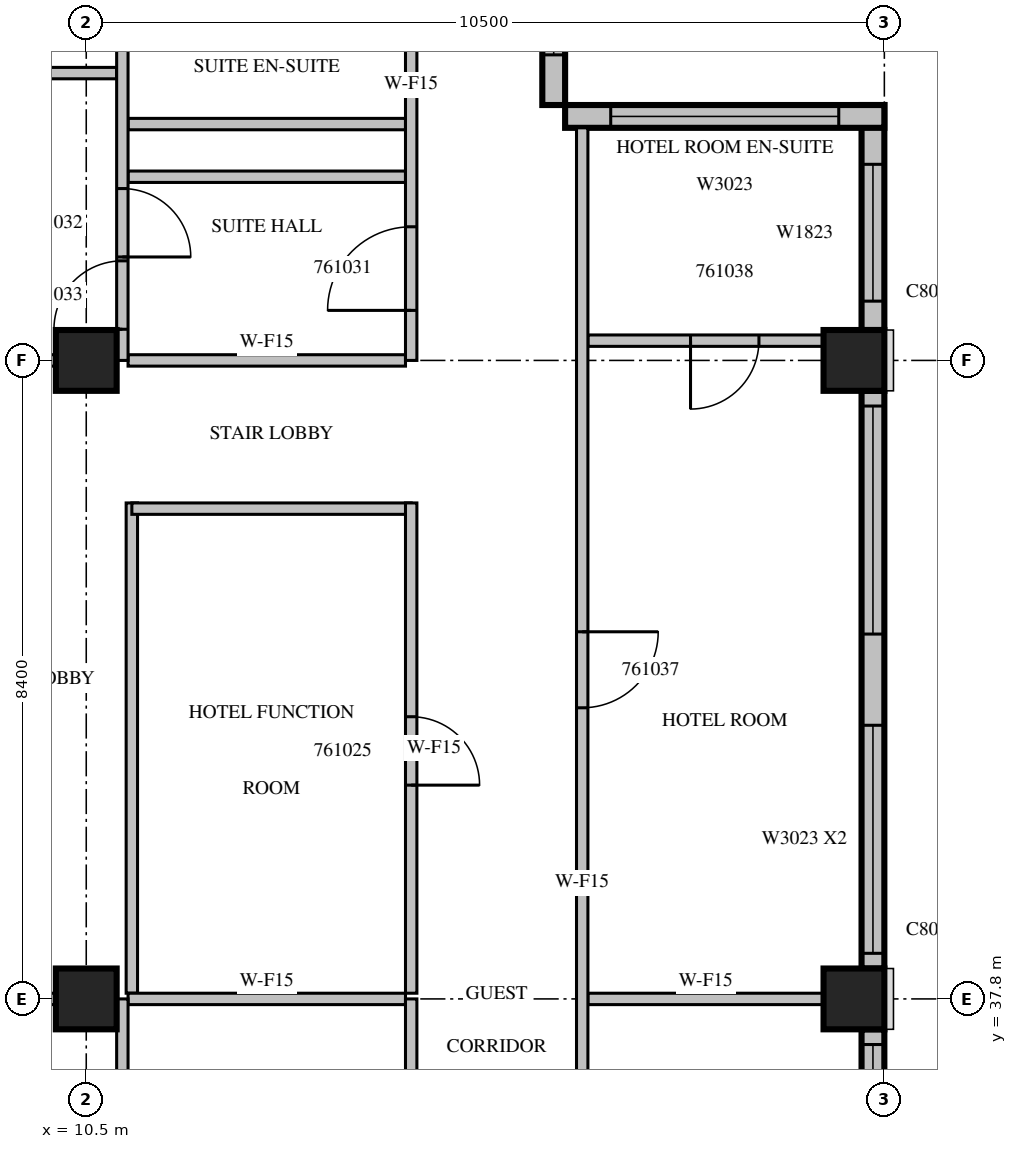
"""IFC4 building model, lengths in metres.
Left out: names, types, materials, properties, quantities, classifications, styles, units other than length and angle.
Written with IfcOpenShell. Run it as: python <this file> out.ifc"""

import sys

from ifc_helpers import new_model, si_unit, direction, frame, frame_2d, origin, origin_2d, place, context, subcontext, project, spatial, rectangle, extrude, source, transform, mapped, element, fill, save


model = new_model("IFC4")
c1 = context("Model", 3, precision=1e-05, world=origin(), true_north=direction((0.0, 1.0)))
c2 = subcontext(c1, "Body", "Model", "MODEL_VIEW")
j1 = project(units=[si_unit("LENGTHUNIT", "METRE"), si_unit("PLANEANGLEUNIT", "RADIAN")], contexts=[c1])
p1 = place(None, origin())
s1 = spatial("IfcSite", under=j1, at=p1, CompositionType="ELEMENT")
p2 = place(p1, origin())
s2 = spatial("IfcBuilding", under=s1, at=p2, CompositionType="ELEMENT")
p3 = place(p2, frame((0.0, 0.0, 265.2)))
s3 = spatial("IfcBuildingStorey", under=s2, at=p3, CompositionType="ELEMENT", Elevation=265.2)
m1 = source(origin(), c2, "Body", "SweptSolid", [
    extrude(rectangle(XDim=0.8, YDim=0.8, at=origin_2d()), origin(), (0.0, 0.0, 1.0), 3.8),
])
for number, where, z_axis, x_axis in (
    (1, (10.5, 37.8, 0.0), (0.0, 0.0, 1.0), (1.0, 0.0, 0.0)),
    (2, (20.6, 37.8, 0.0), (0.0, 0.0, 1.0), (1.0, 0.0, 0.0)),
    (3, (10.5, 46.2, 0.0), (0.0, 0.0, 1.0), (1.0, 0.0, 0.0)),
    (4, (20.6, 46.2, 0.0), (0.0, 0.0, 1.0), (1.0, 0.0, 0.0)),
):
    element("IfcColumn", number, at=place(p3, frame(where, z_axis=z_axis, x_axis=x_axis)), inside=s3, PredefinedType="COLUMN", context=c2, shape_type="MappedRepresentation", body=[
        mapped(m1, transform((0.0, 0.0, 0.0), scale=1.0)),
    ])
m2 = source(origin(), c2, "Body", "SweptSolid", [
    extrude(rectangle(XDim=7.6, YDim=0.3, at=frame_2d((3.8, 0.0))), origin(), (0.0, 0.0, 1.0), 3.4),
])
p4 = place(p3, frame((20.85, 29.8, 0.0), z_axis=(0.0, 0.0, 1.0), x_axis=(0.0, 1.0, 0.0)))
e5 = element("IfcWall", 5, at=p4, inside=s3, PredefinedType="STANDARD", context=c2, shape_type="MappedRepresentation", body=[
    mapped(m2, transform((0.0, 0.0, 0.0), scale=1.0)),
])
m3 = source(origin(), c2, "Body", "SweptSolid", [
    extrude(rectangle(XDim=3.0, YDim=2.3, at=frame_2d((1.5, 1.15))), frame((0.0, 0.16, 0.0), z_axis=(0.0, -1.0, 0.0), x_axis=(1.0, 0.0, 0.0)), (0.0, 0.0, 1.0), 0.32),
])
p5 = place(p4, frame((0.2, 0.0, 0.6)))
e6 = element("IfcOpeningElement", 6, at=p5, cuts=e5, PredefinedType="OPENING", context=c2, shape_type="MappedRepresentation", body=[
    mapped(m3, transform((0.0, 0.0, 0.0), scale=1.0)),
])
p6 = place(p4, frame((4.4, 0.0, 0.6)))
e7 = element("IfcOpeningElement", 7, at=p6, cuts=e5, PredefinedType="OPENING", context=c2, shape_type="MappedRepresentation", body=[
    mapped(m3, transform((0.0, 0.0, 0.0), scale=1.0)),
])
p7 = place(p3, frame((20.85, 38.2, 0.0), z_axis=(0.0, 0.0, 1.0), x_axis=(0.0, 1.0, 0.0)))
e8 = element("IfcWall", 8, at=p7, inside=s3, PredefinedType="STANDARD", context=c2, shape_type="MappedRepresentation", body=[
    mapped(m2, transform((0.0, 0.0, 0.0), scale=1.0)),
])
p8 = place(p7, frame((0.2, 0.0, 0.6)))
e9 = element("IfcOpeningElement", 9, at=p8, cuts=e8, PredefinedType="OPENING", context=c2, shape_type="MappedRepresentation", body=[
    mapped(m3, transform((0.0, 0.0, 0.0), scale=1.0)),
])
p9 = place(p7, frame((4.4, 0.0, 0.6)))
e10 = element("IfcOpeningElement", 10, at=p9, cuts=e8, PredefinedType="OPENING", context=c2, shape_type="MappedRepresentation", body=[
    mapped(m3, transform((0.0, 0.0, 0.0), scale=1.0)),
])
m4 = source(origin(), c2, "Body", "SweptSolid", [
    extrude(rectangle(XDim=2.96, YDim=0.3, at=frame_2d((1.48, 0.0))), origin(), (0.0, 0.0, 1.0), 3.4),
])
p10 = place(p3, frame((20.85, 46.6, 0.0), z_axis=(0.0, 0.0, 1.0), x_axis=(0.0, 1.0, 0.0)))
e11 = element("IfcWall", 11, at=p10, inside=s3, PredefinedType="STANDARD", context=c2, shape_type="MappedRepresentation", body=[
    mapped(m4, transform((0.0, 0.0, 0.0), scale=1.0)),
])
m5 = source(origin(), c2, "Body", "SweptSolid", [
    extrude(rectangle(XDim=1.8, YDim=2.3, at=frame_2d((0.9, 1.15))), frame((0.0, 0.16, 0.0), z_axis=(0.0, -1.0, 0.0), x_axis=(1.0, 0.0, 0.0)), (0.0, 0.0, 1.0), 0.32),
])
p11 = place(p10, frame((0.38, 0.0, 0.6)))
e12 = element("IfcOpeningElement", 12, at=p11, cuts=e11, PredefinedType="OPENING", context=c2, shape_type="MappedRepresentation", body=[
    mapped(m5, transform((0.0, 0.0, 0.0), scale=1.0)),
])
m6 = source(origin(), c2, "Body", "SweptSolid", [
    extrude(rectangle(XDim=4.2, YDim=0.3, at=frame_2d((2.1, 0.0))), origin(), (0.0, 0.0, 1.0), 3.4),
])
p12 = place(p3, frame((21.0, 49.41, 0.0), z_axis=(0.0, 0.0, 1.0), x_axis=(-1.0, 0.0, 0.0)))
e13 = element("IfcWall", 13, at=p12, inside=s3, PredefinedType="STANDARD", context=c2, shape_type="MappedRepresentation", body=[
    mapped(m6, transform((0.0, 0.0, 0.0), scale=1.0)),
])
p13 = place(p12, frame((0.6, 0.0, 0.6)))
e14 = element("IfcOpeningElement", 14, at=p13, cuts=e13, PredefinedType="OPENING", context=c2, shape_type="MappedRepresentation", body=[
    mapped(m3, transform((0.0, 0.0, 0.0), scale=1.0)),
])
m7 = source(origin(), c2, "Body", "SweptSolid", [
    extrude(rectangle(XDim=2.52, YDim=0.3, at=frame_2d((1.26, 0.0))), origin(), (0.0, 0.0, 1.0), 3.4),
])
p14 = place(p3, frame((16.65, 49.56, 0.0), z_axis=(0.0, 0.0, 1.0), x_axis=(0.0, 1.0, 0.0)))
e15 = element("IfcWall", 15, at=p14, inside=s3, PredefinedType="STANDARD", context=c2, shape_type="MappedRepresentation", body=[
    mapped(m7, transform((0.0, 0.0, 0.0), scale=1.0)),
])
m8 = source(origin(), c2, "Body", "SweptSolid", [
    extrude(rectangle(XDim=1.2, YDim=2.3, at=frame_2d((0.6, 1.15))), frame((0.0, 0.16, 0.0), z_axis=(0.0, -1.0, 0.0), x_axis=(1.0, 0.0, 0.0)), (0.0, 0.0, 1.0), 0.32),
])
p15 = place(p14, frame((0.66, 0.0, 0.6)))
e16 = element("IfcOpeningElement", 16, at=p15, cuts=e15, PredefinedType="OPENING", context=c2, shape_type="MappedRepresentation", body=[
    mapped(m8, transform((0.0, 0.0, 0.0), scale=1.0)),
])
m9 = source(origin(), c2, "Body", "SweptSolid", [
    extrude(rectangle(XDim=6.45, YDim=0.15, at=frame_2d((3.225, 0.0))), origin(), (0.0, 0.0, 1.0), 3.4),
])
p16 = place(p3, frame((11.1, 44.325, 0.0), z_axis=(0.0, 0.0, 1.0), x_axis=(0.0, -1.0, 0.0)))
e17 = element("IfcWall", 17, at=p16, inside=s3, PredefinedType="PARTITIONING", context=c2, shape_type="MappedRepresentation", body=[
    mapped(m9, transform((0.0, 0.0, 0.0), scale=1.0)),
])
m10 = source(origin(), c2, "Body", "SweptSolid", [
    extrude(rectangle(XDim=3.675, YDim=0.15, at=frame_2d((1.837, 0.0))), origin(), (0.0, 0.0, 1.0), 3.4),
])
p17 = place(p3, frame((14.775, 44.25, 0.0), z_axis=(0.0, 0.0, 1.0), x_axis=(-1.0, 0.0, 0.0)))
e18 = element("IfcWall", 18, at=p17, inside=s3, PredefinedType="PARTITIONING", context=c2, shape_type="MappedRepresentation", body=[
    mapped(m10, transform((0.0, 0.0, 0.0), scale=1.0)),
])
p18 = place(p3, frame((14.775, 37.875, 0.0), z_axis=(0.0, 0.0, 1.0), x_axis=(0.0, 1.0, 0.0)))
e19 = element("IfcWall", 19, at=p18, inside=s3, PredefinedType="PARTITIONING", context=c2, shape_type="MappedRepresentation", body=[
    mapped(m9, transform((0.0, 0.0, 0.0), scale=1.0)),
])
m11 = source(origin(), c2, "Body", "SweptSolid", [
    extrude(rectangle(XDim=0.9, YDim=2.1, at=frame_2d((0.45, 1.05))), frame((0.0, 0.085, 0.0), z_axis=(0.0, -1.0, 0.0), x_axis=(1.0, 0.0, 0.0)), (0.0, 0.0, 1.0), 0.17),
])
p19 = place(p18, frame((2.737, 0.0, 0.0)))
e20 = element("IfcOpeningElement", 20, at=p19, cuts=e19, PredefinedType="OPENING", context=c2, shape_type="MappedRepresentation", body=[
    mapped(m11, transform((0.0, 0.0, 0.0), scale=1.0)),
])
m12 = source(origin(), c2, "Body", "SweptSolid", [
    extrude(rectangle(XDim=3.596, YDim=0.15, at=frame_2d((1.798, 0.0))), origin(), (0.0, 0.0, 1.0), 3.4),
])
p20 = place(p3, frame((10.101, 37.8, 0.0), z_axis=(0.0, 0.0, 1.0), x_axis=(-1.0, 0.0, 0.0)))
e21 = element("IfcWall", 21, at=p20, inside=s3, PredefinedType="PARTITIONING", context=c2, shape_type="MappedRepresentation", body=[
    mapped(m12, transform((0.0, 0.0, 0.0), scale=1.0)),
])
m13 = source(origin(), c2, "Body", "SweptSolid", [
    extrude(rectangle(XDim=3.65, YDim=0.15, at=frame_2d((1.825, 0.0))), origin(), (0.0, 0.0, 1.0), 3.4),
])
p21 = place(p3, frame((14.7, 37.8, 0.0), z_axis=(0.0, 0.0, 1.0), x_axis=(-1.0, 0.0, 0.0)))
e22 = element("IfcWall", 22, at=p21, inside=s3, PredefinedType="PARTITIONING", context=c2, shape_type="MappedRepresentation", body=[
    mapped(m13, transform((0.0, 0.0, 0.0), scale=1.0)),
])
m14 = source(origin(), c2, "Body", "SweptSolid", [
    extrude(rectangle(XDim=8.4, YDim=0.15, at=frame_2d((4.2, 0.0))), origin(), (0.0, 0.0, 1.0), 3.4),
])
p22 = place(p3, frame((10.975, 29.4, 0.0), z_axis=(0.0, 0.0, 1.0), x_axis=(0.0, 1.0, 0.0)))
e23 = element("IfcWall", 23, at=p22, inside=s3, PredefinedType="PARTITIONING", context=c2, shape_type="MappedRepresentation", body=[
    mapped(m14, transform((0.0, 0.0, 0.0), scale=1.0)),
])
m15 = source(origin(), c2, "Body", "SweptSolid", [
    extrude(rectangle(XDim=1.1, YDim=2.1, at=frame_2d((0.55, 1.05))), frame((0.0, 0.085, 0.0), z_axis=(0.0, -1.0, 0.0), x_axis=(1.0, 0.0, 0.0)), (0.0, 0.0, 1.0), 0.17),
])
p23 = place(p22, frame((0.851, 0.0, 0.0)))
e24 = element("IfcOpeningElement", 24, at=p23, cuts=e23, PredefinedType="OPENING", context=c2, shape_type="MappedRepresentation", body=[
    mapped(m15, transform((0.0, 0.0, 0.0), scale=1.0)),
])
p24 = place(p22, frame((3.38, 0.0, 0.0)))
e25 = element("IfcOpeningElement", 25, at=p24, cuts=e23, PredefinedType="OPENING", context=c2, shape_type="MappedRepresentation", body=[
    mapped(m11, transform((0.0, 0.0, 0.0), scale=1.0)),
])
p25 = place(p22, frame((6.179, 0.0, 0.0)))
e26 = element("IfcOpeningElement", 26, at=p25, cuts=e23, PredefinedType="OPENING", context=c2, shape_type="MappedRepresentation", body=[
    mapped(m11, transform((0.0, 0.0, 0.0), scale=1.0)),
])
m16 = source(origin(), c2, "Body", "SweptSolid", [
    extrude(rectangle(XDim=4.395, YDim=0.15, at=frame_2d((2.197, 0.0))), origin(), (0.0, 0.0, 1.0), 3.4),
])
p26 = place(p3, frame((10.9, 49.98, 0.0), z_axis=(0.0, 0.0, 1.0), x_axis=(-1.0, 0.0, 0.0)))
e27 = element("IfcWall", 27, at=p26, inside=s3, PredefinedType="PARTITIONING", context=c2, shape_type="MappedRepresentation", body=[
    mapped(m16, transform((0.0, 0.0, 0.0), scale=1.0)),
])
m17 = source(origin(), c2, "Body", "SweptSolid", [
    extrude(rectangle(XDim=1.0, YDim=2.1, at=frame_2d((0.5, 1.05))), frame((0.0, 0.085, 0.0), z_axis=(0.0, -1.0, 0.0), x_axis=(1.0, 0.0, 0.0)), (0.0, 0.0, 1.0), 0.17),
])
p27 = place(p26, frame((3.3, 0.0, 0.0)))
e28 = element("IfcOpeningElement", 28, at=p27, cuts=e27, PredefinedType="OPENING", context=c2, shape_type="MappedRepresentation", body=[
    mapped(m17, transform((0.0, 0.0, 0.0), scale=1.0)),
])
for number, where, z_axis, x_axis in (
    (29, (14.7, 48.617, 0.0), (0.0, 0.0, 1.0), (-1.0, 0.0, 0.0)),
    (30, (14.7, 49.309, 0.0), (0.0, 0.0, 1.0), (-1.0, 0.0, 0.0)),
):
    element("IfcWall", number, at=place(p3, frame(where, z_axis=z_axis, x_axis=x_axis)), inside=s3, PredefinedType="PARTITIONING", context=c2, shape_type="MappedRepresentation", body=[
        mapped(m13, transform((0.0, 0.0, 0.0), scale=1.0)),
    ])
p28 = place(p3, frame((10.101, 46.2, 0.0), z_axis=(0.0, 0.0, 1.0), x_axis=(-1.0, 0.0, 0.0)))
e31 = element("IfcWall", 31, at=p28, inside=s3, PredefinedType="PARTITIONING", context=c2, shape_type="MappedRepresentation", body=[
    mapped(m12, transform((0.0, 0.0, 0.0), scale=1.0)),
])
p29 = place(p3, frame((14.7, 46.2, 0.0), z_axis=(0.0, 0.0, 1.0), x_axis=(-1.0, 0.0, 0.0)))
e32 = element("IfcWall", 32, at=p29, inside=s3, PredefinedType="PARTITIONING", context=c2, shape_type="MappedRepresentation", body=[
    mapped(m13, transform((0.0, 0.0, 0.0), scale=1.0)),
])
m18 = source(origin(), c2, "Body", "SweptSolid", [
    extrude(rectangle(XDim=7.26, YDim=0.15, at=frame_2d((3.63, 0.0))), origin(), (0.0, 0.0, 1.0), 3.4),
])
p30 = place(p3, frame((10.975, 46.2, 0.0), z_axis=(0.0, 0.0, 1.0), x_axis=(0.0, 1.0, 0.0)))
e33 = element("IfcWall", 33, at=p30, inside=s3, PredefinedType="PARTITIONING", context=c2, shape_type="MappedRepresentation", body=[
    mapped(m18, transform((0.0, 0.0, 0.0), scale=1.0)),
])
p31 = place(p30, frame((1.361, 0.0, 0.0)))
e34 = element("IfcOpeningElement", 34, at=p31, cuts=e33, PredefinedType="OPENING", context=c2, shape_type="MappedRepresentation", body=[
    mapped(m11, transform((0.0, 0.0, 0.0), scale=1.0)),
])
p32 = place(p30, frame((0.41, 0.0, 0.0)))
e35 = element("IfcOpeningElement", 35, at=p32, cuts=e33, PredefinedType="OPENING", context=c2, shape_type="MappedRepresentation", body=[
    mapped(m11, transform((0.0, 0.0, 0.0), scale=1.0)),
])
p33 = place(p30, frame((4.096, 0.0, 0.0)))
e36 = element("IfcOpeningElement", 36, at=p33, cuts=e33, PredefinedType="OPENING", context=c2, shape_type="MappedRepresentation", body=[
    mapped(m11, transform((0.0, 0.0, 0.0), scale=1.0)),
])
m19 = source(origin(), c2, "Body", "SweptSolid", [
    extrude(rectangle(XDim=3.101, YDim=0.15, at=frame_2d((1.55, 0.0))), origin(), (0.0, 0.0, 1.0), 3.4),
])
p34 = place(p3, frame((17.1, 46.46, 0.0), z_axis=(0.0, 0.0, 1.0), x_axis=(1.0, 0.0, 0.0)))
e37 = element("IfcWall", 37, at=p34, inside=s3, PredefinedType="PARTITIONING", context=c2, shape_type="MappedRepresentation", body=[
    mapped(m19, transform((0.0, 0.0, 0.0), scale=1.0)),
])
p35 = place(p34, frame((1.35, 0.0, 0.0)))
e38 = element("IfcOpeningElement", 38, at=p35, cuts=e37, PredefinedType="OPENING", context=c2, shape_type="MappedRepresentation", body=[
    mapped(m11, transform((0.0, 0.0, 0.0), scale=1.0)),
])
p36 = place(p3, frame((20.201, 37.8, 0.0), z_axis=(0.0, 0.0, 1.0), x_axis=(-1.0, 0.0, 0.0)))
e39 = element("IfcWall", 39, at=p36, inside=s3, PredefinedType="PARTITIONING", context=c2, shape_type="MappedRepresentation", body=[
    mapped(m19, transform((0.0, 0.0, 0.0), scale=1.0)),
])
p37 = place(p3, frame((14.775, 29.4, 0.0), z_axis=(0.0, 0.0, 1.0), x_axis=(0.0, 1.0, 0.0)))
e40 = element("IfcWall", 40, at=p37, inside=s3, PredefinedType="PARTITIONING", context=c2, shape_type="MappedRepresentation", body=[
    mapped(m14, transform((0.0, 0.0, 0.0), scale=1.0)),
])
p38 = place(p37, frame((0.638, 0.0, 0.0)))
e41 = element("IfcOpeningElement", 41, at=p38, cuts=e40, PredefinedType="OPENING", context=c2, shape_type="MappedRepresentation", body=[
    mapped(m15, transform((0.0, 0.0, 0.0), scale=1.0)),
])
p39 = place(p3, frame((14.775, 46.2, 0.0), z_axis=(0.0, 0.0, 1.0), x_axis=(0.0, 1.0, 0.0)))
e42 = element("IfcWall", 42, at=p39, inside=s3, PredefinedType="PARTITIONING", context=c2, shape_type="MappedRepresentation", body=[
    mapped(m18, transform((0.0, 0.0, 0.0), scale=1.0)),
])
p40 = place(p39, frame((0.658, 0.0, 0.0)))
e43 = element("IfcOpeningElement", 43, at=p40, cuts=e42, PredefinedType="OPENING", context=c2, shape_type="MappedRepresentation", body=[
    mapped(m15, transform((0.0, 0.0, 0.0), scale=1.0)),
])
m20 = source(origin(), c2, "Body", "SweptSolid", [
    extrude(rectangle(XDim=19.86, YDim=0.15, at=frame_2d((9.93, 0.0))), origin(), (0.0, 0.0, 1.0), 3.4),
])
p41 = place(p3, frame((17.025, 49.26, 0.0), z_axis=(0.0, 0.0, 1.0), x_axis=(0.0, -1.0, 0.0)))
e44 = element("IfcWall", 44, at=p41, inside=s3, PredefinedType="PARTITIONING", context=c2, shape_type="MappedRepresentation", body=[
    mapped(m20, transform((0.0, 0.0, 0.0), scale=1.0)),
])
m21 = source(origin(), c2, "Body", "SweptSolid", [
    extrude(rectangle(XDim=1.2, YDim=2.1, at=frame_2d((0.6, 1.05))), frame((0.0, 0.085, 0.0), z_axis=(0.0, -1.0, 0.0), x_axis=(1.0, 0.0, 0.0)), (0.0, 0.0, 1.0), 0.17),
])
p42 = place(p41, frame((15.06, 0.0, 0.0)))
e45 = element("IfcOpeningElement", 45, at=p42, cuts=e44, PredefinedType="OPENING", context=c2, shape_type="MappedRepresentation", body=[
    mapped(m21, transform((0.0, 0.0, 0.0), scale=1.0)),
])
p43 = place(p41, frame((6.63, 0.0, 0.0)))
e46 = element("IfcOpeningElement", 46, at=p43, cuts=e44, PredefinedType="OPENING", context=c2, shape_type="MappedRepresentation", body=[
    mapped(m17, transform((0.0, 0.0, 0.0), scale=1.0)),
])
m22 = source(origin(), c2, "Body", "SweptSolid", [
    extrude(rectangle(XDim=3.0, YDim=2.3, at=frame_2d((1.5, 1.15))), frame((0.0, 0.03, 0.0), z_axis=(0.0, -1.0, 0.0), x_axis=(1.0, 0.0, 0.0)), (0.0, 0.0, 1.0), 0.06),
])
p44 = place(p6, origin())
e47 = element("IfcWindow", 47, at=p44, inside=s3, PartitioningType="SINGLE_PANEL", PredefinedType="WINDOW", context=c2, shape_type="MappedRepresentation", body=[
    mapped(m22, transform((0.0, 0.0, 0.0), scale=1.0)),
])
fill(e7, e47)
p45 = place(p8, origin())
e48 = element("IfcWindow", 48, at=p45, inside=s3, PartitioningType="SINGLE_PANEL", PredefinedType="WINDOW", context=c2, shape_type="MappedRepresentation", body=[
    mapped(m22, transform((0.0, 0.0, 0.0), scale=1.0)),
])
fill(e9, e48)
p46 = place(p9, origin())
e49 = element("IfcWindow", 49, at=p46, inside=s3, PartitioningType="SINGLE_PANEL", PredefinedType="WINDOW", context=c2, shape_type="MappedRepresentation", body=[
    mapped(m22, transform((0.0, 0.0, 0.0), scale=1.0)),
])
fill(e10, e49)
m23 = source(origin(), c2, "Body", "SweptSolid", [
    extrude(rectangle(XDim=1.8, YDim=2.3, at=frame_2d((0.9, 1.15))), frame((0.0, 0.03, 0.0), z_axis=(0.0, -1.0, 0.0), x_axis=(1.0, 0.0, 0.0)), (0.0, 0.0, 1.0), 0.06),
])
p47 = place(p11, origin())
e50 = element("IfcWindow", 50, at=p47, inside=s3, PartitioningType="SINGLE_PANEL", PredefinedType="WINDOW", context=c2, shape_type="MappedRepresentation", body=[
    mapped(m23, transform((0.0, 0.0, 0.0), scale=1.0)),
])
fill(e12, e50)
p48 = place(p13, origin())
e51 = element("IfcWindow", 51, at=p48, inside=s3, PartitioningType="SINGLE_PANEL", PredefinedType="WINDOW", context=c2, shape_type="MappedRepresentation", body=[
    mapped(m22, transform((0.0, 0.0, 0.0), scale=1.0)),
])
fill(e14, e51)
m24 = source(origin(), c2, "Body", "SweptSolid", [
    extrude(rectangle(XDim=1.2, YDim=2.3, at=frame_2d((0.6, 1.15))), frame((0.0, 0.03, 0.0), z_axis=(0.0, -1.0, 0.0), x_axis=(1.0, 0.0, 0.0)), (0.0, 0.0, 1.0), 0.06),
])
p49 = place(p15, origin())
e52 = element("IfcWindow", 52, at=p49, inside=s3, PartitioningType="SINGLE_PANEL", PredefinedType="WINDOW", context=c2, shape_type="MappedRepresentation", body=[
    mapped(m24, transform((0.0, 0.0, 0.0), scale=1.0)),
])
fill(e16, e52)
m25 = source(origin(), c2, "Body", "SweptSolid", [
    extrude(rectangle(XDim=0.9, YDim=2.1, at=frame_2d((0.45, 1.05))), frame((0.0, 0.025, 0.0), z_axis=(0.0, -1.0, 0.0), x_axis=(1.0, 0.0, 0.0)), (0.0, 0.0, 1.0), 0.05),
])
p50 = place(p19, origin())
e53 = element("IfcDoor", 53, at=p50, inside=s3, OperationType="SINGLE_SWING_RIGHT", PredefinedType="DOOR", context=c2, shape_type="MappedRepresentation", body=[
    mapped(m25, transform((0.0, 0.0, 0.0), scale=1.0)),
])
fill(e20, e53)
m26 = source(origin(), c2, "Body", "SweptSolid", [
    extrude(rectangle(XDim=1.1, YDim=2.1, at=frame_2d((0.55, 1.05))), frame((0.0, 0.025, 0.0), z_axis=(0.0, -1.0, 0.0), x_axis=(1.0, 0.0, 0.0)), (0.0, 0.0, 1.0), 0.05),
])
p51 = place(p40, origin())
e54 = element("IfcDoor", 54, at=p51, inside=s3, OperationType="SINGLE_SWING_LEFT", PredefinedType="DOOR", context=c2, shape_type="MappedRepresentation", body=[
    mapped(m26, transform((0.0, 0.0, 0.0), scale=1.0)),
])
fill(e43, e54)
p52 = place(p31, origin())
e55 = element("IfcDoor", 55, at=p52, inside=s3, OperationType="SINGLE_SWING_RIGHT", PredefinedType="DOOR", context=c2, shape_type="MappedRepresentation", body=[
    mapped(m25, transform((0.0, 0.0, 0.0), scale=1.0)),
])
fill(e34, e55)
p53 = place(p32, origin())
e56 = element("IfcDoor", 56, at=p53, inside=s3, OperationType="SINGLE_SWING_LEFT", PredefinedType="DOOR", context=c2, shape_type="MappedRepresentation", body=[
    mapped(m25, transform((0.0, 0.0, 0.0), scale=1.0)),
])
fill(e35, e56)
m27 = source(origin(), c2, "Body", "SweptSolid", [
    extrude(rectangle(XDim=1.0, YDim=2.1, at=frame_2d((0.5, 1.05))), frame((0.0, 0.025, 0.0), z_axis=(0.0, -1.0, 0.0), x_axis=(1.0, 0.0, 0.0)), (0.0, 0.0, 1.0), 0.05),
])
p54 = place(p43, origin())
e57 = element("IfcDoor", 57, at=p54, inside=s3, OperationType="SINGLE_SWING_LEFT", PredefinedType="DOOR", context=c2, shape_type="MappedRepresentation", body=[
    mapped(m27, transform((0.0, 0.0, 0.0), scale=1.0)),
])
fill(e46, e57)
p55 = place(p35, origin())
e58 = element("IfcDoor", 58, at=p55, inside=s3, OperationType="SINGLE_SWING_RIGHT", PredefinedType="DOOR", context=c2, shape_type="MappedRepresentation", body=[
    mapped(m25, transform((0.0, 0.0, 0.0), scale=1.0)),
])
fill(e38, e58)
save(model, sys.argv[1])
